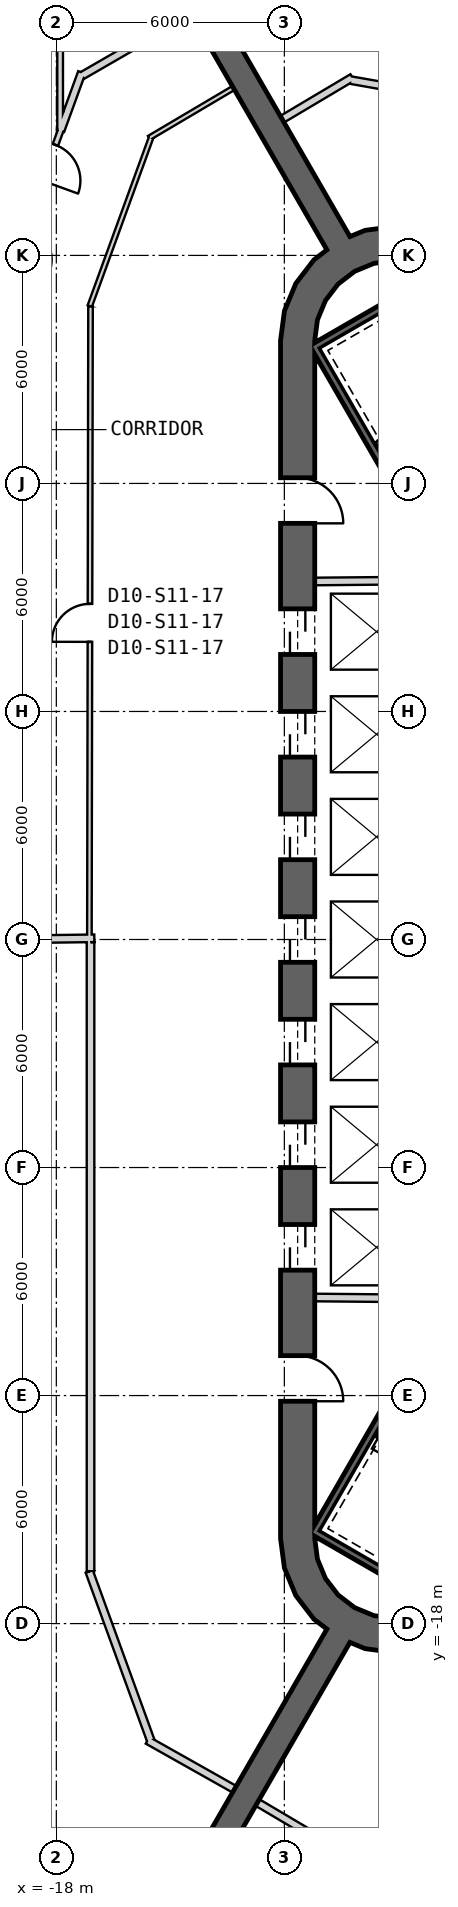
"""IFC4 building model, lengths in metres.
Left out: names, types, materials, properties, quantities, classifications, styles, units other than length and angle.
Written with IfcOpenShell. Run it as: python <this file> out.ifc"""

import sys

from ifc_helpers import new_model, si_unit, direction, frame, frame_2d, origin, place, context, subcontext, project, spatial, polyline, rectangle, outline, extrude, element, fill, save


model = new_model("IFC4")
c1 = context("Model", 3, precision=1e-05, world=origin(), true_north=direction((0.0, 1.0)))
c2 = subcontext(c1, "Body", "Model", "MODEL_VIEW")
j1 = project(units=[si_unit("LENGTHUNIT", "METRE"), si_unit("PLANEANGLEUNIT", "RADIAN")], contexts=[c1])
p1 = place(None, origin())
s1 = spatial("IfcSite", under=j1, at=p1, CompositionType="ELEMENT")
p2 = place(p1, origin())
s2 = spatial("IfcBuilding", under=s1, at=p2, CompositionType="ELEMENT")
p3 = place(p2, frame((0.0, 0.0, 193.2)))
s3 = spatial("IfcBuildingStorey", under=s2, at=p3, CompositionType="ELEMENT", Elevation=193.2)
p4 = place(p3, frame((-11.65, 15.762, 0.0), z_axis=(0.0, 0.0, 1.0), x_axis=(0.0, -1.0, 0.0)))
e1 = element("IfcWall", 1, at=p4, inside=s3, PredefinedType="SHEAR", context=c2, shape_type="SweptSolid", body=[
    extrude(rectangle(XDim=31.523, YDim=0.9, at=frame_2d((15.762, 0.0))), origin(), (0.0, 0.0, 1.0), 4.0),
])
p5 = place(p4, frame((7.062, 0.0, 0.0)))
e2 = element("IfcOpeningElement", 2, at=p5, cuts=e1, PredefinedType="OPENING", context=c2, shape_type="SweptSolid", body=[
    extrude(rectangle(XDim=1.2, YDim=2.4, at=frame_2d((0.6, 1.2))), frame((0.0, 0.46, 0.0), z_axis=(0.0, -1.0, 0.0), x_axis=(1.0, 0.0, 0.0)), (0.0, 0.0, 1.0), 0.92),
])
p6 = place(p4, frame((9.762, 0.0, 0.0)))
e3 = element("IfcOpeningElement", 3, at=p6, cuts=e1, PredefinedType="OPENING", context=c2, shape_type="SweptSolid", body=[
    extrude(rectangle(XDim=1.2, YDim=2.4, at=frame_2d((0.6, 1.2))), frame((0.0, 0.46, 0.0), z_axis=(0.0, -1.0, 0.0), x_axis=(1.0, 0.0, 0.0)), (0.0, 0.0, 1.0), 0.92),
])
p7 = place(p4, frame((12.462, 0.0, 0.0)))
e4 = element("IfcOpeningElement", 4, at=p7, cuts=e1, PredefinedType="OPENING", context=c2, shape_type="SweptSolid", body=[
    extrude(rectangle(XDim=1.2, YDim=2.4, at=frame_2d((0.6, 1.2))), frame((0.0, 0.46, 0.0), z_axis=(0.0, -1.0, 0.0), x_axis=(1.0, 0.0, 0.0)), (0.0, 0.0, 1.0), 0.92),
])
p8 = place(p4, frame((15.162, 0.0, 0.0)))
e5 = element("IfcOpeningElement", 5, at=p8, cuts=e1, PredefinedType="OPENING", context=c2, shape_type="SweptSolid", body=[
    extrude(rectangle(XDim=1.2, YDim=2.4, at=frame_2d((0.6, 1.2))), frame((0.0, 0.46, 0.0), z_axis=(0.0, -1.0, 0.0), x_axis=(1.0, 0.0, 0.0)), (0.0, 0.0, 1.0), 0.92),
])
p9 = place(p4, frame((17.862, 0.0, 0.0)))
e6 = element("IfcOpeningElement", 6, at=p9, cuts=e1, PredefinedType="OPENING", context=c2, shape_type="SweptSolid", body=[
    extrude(rectangle(XDim=1.2, YDim=2.4, at=frame_2d((0.6, 1.2))), frame((0.0, 0.46, 0.0), z_axis=(0.0, -1.0, 0.0), x_axis=(1.0, 0.0, 0.0)), (0.0, 0.0, 1.0), 0.92),
])
p10 = place(p4, frame((20.562, 0.0, 0.0)))
e7 = element("IfcOpeningElement", 7, at=p10, cuts=e1, PredefinedType="OPENING", context=c2, shape_type="SweptSolid", body=[
    extrude(rectangle(XDim=1.2, YDim=2.4, at=frame_2d((0.6, 1.2))), frame((0.0, 0.46, 0.0), z_axis=(0.0, -1.0, 0.0), x_axis=(1.0, 0.0, 0.0)), (0.0, 0.0, 1.0), 0.92),
])
p11 = place(p4, frame((23.262, 0.0, 0.0)))
e8 = element("IfcOpeningElement", 8, at=p11, cuts=e1, PredefinedType="OPENING", context=c2, shape_type="SweptSolid", body=[
    extrude(rectangle(XDim=1.2, YDim=2.4, at=frame_2d((0.6, 1.2))), frame((0.0, 0.46, 0.0), z_axis=(0.0, -1.0, 0.0), x_axis=(1.0, 0.0, 0.0)), (0.0, 0.0, 1.0), 0.92),
])
p12 = place(p4, frame((3.612, 0.0, 0.0)))
e9 = element("IfcOpeningElement", 9, at=p12, cuts=e1, PredefinedType="OPENING", context=c2, shape_type="SweptSolid", body=[
    extrude(rectangle(XDim=1.2, YDim=2.4, at=frame_2d((0.6, 1.2))), frame((0.0, 0.46, 0.0), z_axis=(0.0, -1.0, 0.0), x_axis=(1.0, 0.0, 0.0)), (0.0, 0.0, 1.0), 0.92),
])
p13 = place(p4, frame((26.712, 0.0, 0.0)))
e10 = element("IfcOpeningElement", 10, at=p13, cuts=e1, PredefinedType="OPENING", context=c2, shape_type="SweptSolid", body=[
    extrude(rectangle(XDim=1.2, YDim=2.4, at=frame_2d((0.6, 1.2))), frame((0.0, 0.46, 0.0), z_axis=(0.0, -1.0, 0.0), x_axis=(1.0, 0.0, 0.0)), (0.0, 0.0, 1.0), 0.92),
])
p14 = place(p3, origin())
e11 = element("IfcWall", 11, at=p14, inside=s3, PredefinedType="SHEAR", context=c2, shape_type="SweptSolid", body=[
    extrude(outline(polyline([(-7.6, 18.36), (-8.323, 18.659), (-9.1, 18.762), (-9.876, 18.659), (-10.6, 18.36), (-11.221, 17.883), (-11.698, 17.262), (-11.998, 16.538), (-12.1, 15.762), (-11.2, 15.762), (-11.128, 16.305), (-10.919, 16.812), (-10.585, 17.247), (-10.15, 17.58), (-9.644, 17.79), (-9.1, 17.862), (-8.556, 17.79), (-8.05, 17.58), (-7.6, 18.36)])), origin(), (0.0, 0.0, 1.0), 4.0),
])
p15 = place(p3, origin())
e12 = element("IfcWall", 12, at=p15, inside=s3, PredefinedType="SHEAR", context=c2, shape_type="SweptSolid", body=[
    extrude(outline(polyline([(-12.1, -15.762), (-11.998, -16.538), (-11.698, -17.262), (-11.221, -17.883), (-10.6, -18.36), (-9.876, -18.659), (-9.1, -18.762), (-8.323, -18.659), (-7.6, -18.36), (-8.05, -17.58), (-8.556, -17.79), (-9.1, -17.862), (-9.644, -17.79), (-10.15, -17.58), (-10.585, -17.247), (-10.919, -16.812), (-11.128, -16.305), (-11.2, -15.762), (-12.1, -15.762)])), origin(), (0.0, 0.0, 1.0), 4.0),
])
for number, where, z_axis, x_axis in (
    (13, (-10.575, 18.316, 0.0), (0.0, 0.0, 1.0), (-0.5, 0.866, 0.0)),
    (14, (-10.575, -18.316, 0.0), (0.0, 0.0, 1.0), (-0.5, -0.866, 0.0)),
):
    element("IfcWall", number, at=place(p3, frame(where, z_axis=z_axis, x_axis=x_axis)), inside=s3, PredefinedType="SHEAR", context=c2, shape_type="SweptSolid", body=[
        extrude(rectangle(XDim=12.007, YDim=0.7, at=frame_2d((6.003, 0.0))), origin(), (0.0, 0.0, 1.0), 4.0),
    ])
p16 = place(p3, frame((-11.2, 9.42, 0.0), z_axis=(0.0, 0.0, 1.0), x_axis=(0.999957167047, 0.009255488683, 0.0)))
e15 = element("IfcWall", 15, at=p16, inside=s3, PredefinedType="PLUMBINGWALL", context=c2, shape_type="SweptSolid", body=[
    extrude(rectangle(XDim=3.35, YDim=0.2, at=frame_2d((1.675, 0.0))), origin(), (0.0, 0.0, 1.0), 3.7),
])
p17 = place(p3, frame((-8.05, -9.449, 0.0), z_axis=(0.0, 0.0, 1.0), x_axis=(-0.999957467379, 0.009222983926, 0.0)))
e16 = element("IfcWall", 16, at=p17, inside=s3, PredefinedType="PLUMBINGWALL", context=c2, shape_type="SweptSolid", body=[
    extrude(rectangle(XDim=3.15, YDim=0.2, at=frame_2d((1.575, 0.0))), origin(), (0.0, 0.0, 1.0), 3.7),
])
p18 = place(p3, frame((-11.245, 15.678, -0.3), z_axis=(0.0, 0.0, 1.0), x_axis=(0.499977274689, -0.866038523851, 0.0)))
e17 = element("IfcWall", 17, at=p18, inside=s3, PredefinedType="SHEAR", context=c2, shape_type="SweptSolid", body=[
    extrude(rectangle(XDim=8.1, YDim=0.2, at=frame_2d((4.05, 0.0))), origin(), (0.0, 0.0, 1.0), 4.0),
])
for number, where, z_axis, x_axis in (
    (18, (-7.818, 17.541, -0.3), (0.0, 0.0, 1.0), (-0.866, -0.5, 0.0)),
    (19, (-11.282, -15.541, -0.3), (0.0, 0.0, 1.0), (0.866, -0.5, 0.0)),
):
    element("IfcWall", number, at=place(p3, frame(where, z_axis=z_axis, x_axis=x_axis)), inside=s3, PredefinedType="SHEAR", context=c2, shape_type="SweptSolid", body=[
        extrude(rectangle(XDim=3.8, YDim=0.2, at=frame_2d((1.9, 0.0))), origin(), (0.0, 0.0, 1.0), 4.0),
    ])
p19 = place(p3, frame((-7.196, -8.663, -0.3), z_axis=(0.0, 0.0, 1.0), x_axis=(-0.499997992926, -0.866026562566, 0.0)))
e20 = element("IfcWall", 20, at=p19, inside=s3, PredefinedType="SHEAR", context=c2, shape_type="SweptSolid", body=[
    extrude(rectangle(XDim=7.9, YDim=0.2, at=frame_2d((3.95, 0.0))), origin(), (0.0, 0.0, 1.0), 4.0),
])
p20 = place(p3, frame((-13.339, 22.405, 0.0), z_axis=(0.0, 0.0, 1.0), x_axis=(-0.86070028932, -0.509111983718, 0.0)))
e21 = element("IfcWall", 21, at=p20, inside=s3, PredefinedType="PARTITIONING", context=c2, shape_type="SweptSolid", body=[
    extrude(rectangle(XDim=2.579, YDim=0.12, at=frame_2d((1.29, 0.0))), origin(), (0.0, 0.0, 1.0), 3.7),
])
p21 = place(p3, frame((-15.506, 21.103, 0.0), z_axis=(0.0, 0.0, 1.0), x_axis=(-0.342017079535, -0.939693735909, 0.0)))
e22 = element("IfcWall", 22, at=p21, inside=s3, PredefinedType="PARTITIONING", context=c2, shape_type="SweptSolid", body=[
    extrude(rectangle(XDim=4.721, YDim=0.12, at=frame_2d((2.361, 0.0))), origin(), (0.0, 0.0, 1.0), 2.78),
])
p22 = place(p3, frame((-17.13, 0.0, 0.0), z_axis=(0.0, 0.0, 1.0), x_axis=(0.001787542932, 0.999998402344, 0.0)))
e23 = element("IfcWall", 23, at=p22, inside=s3, PredefinedType="PARTITIONING", context=c2, shape_type="SweptSolid", body=[
    extrude(rectangle(XDim=16.663, YDim=0.12, at=frame_2d((8.331, 0.0))), origin(), (0.0, 0.0, 1.0), 2.88),
])
p23 = place(p22, frame((7.831, 0.0, 0.0)))
e24 = element("IfcOpeningElement", 24, at=p23, cuts=e23, PredefinedType="OPENING", context=c2, shape_type="SweptSolid", body=[
    extrude(rectangle(XDim=1.0, YDim=2.1, at=frame_2d((0.5, 1.05))), frame((0.0, 0.07, 0.0), z_axis=(0.0, -1.0, 0.0), x_axis=(1.0, 0.0, 0.0)), (0.0, 0.0, 1.0), 0.14),
])
p24 = place(p3, frame((-19.5, -0.001, 0.0), z_axis=(0.0, 0.0, 1.0), x_axis=(0.999915662945, 0.012987185857, 0.0)))
e25 = element("IfcWall", 25, at=p24, inside=s3, PredefinedType="PARTITIONING", context=c2, shape_type="SweptSolid", body=[
    extrude(rectangle(XDim=2.5, YDim=0.2, at=frame_2d((1.25, 0.0))), origin(), (0.0, 0.0, 1.0), 3.07),
])
p25 = place(p3, frame((-17.331, 22.814, 0.0), z_axis=(0.0, 0.0, 1.0), x_axis=(-0.342055959579, -0.939679583963, 0.0)))
e26 = element("IfcWall", 26, at=p25, inside=s3, PredefinedType="PARTITIONING", context=c2, shape_type="SweptSolid", body=[
    extrude(rectangle(XDim=1.629, YDim=0.2, at=frame_2d((0.814, 0.0))), origin(), (0.0, 0.0, 1.0), 2.78),
])
p26 = place(p3, frame((-14.98, 24.083, 0.0), z_axis=(0.0, 0.0, 1.0), x_axis=(-0.866008795918, -0.500028764566, 0.0)))
e27 = element("IfcWall", 27, at=p26, inside=s3, PredefinedType="PARTITIONING", context=c2, shape_type="SweptSolid", body=[
    extrude(rectangle(XDim=2.714, YDim=0.2, at=frame_2d((1.357, 0.0))), origin(), (0.0, 0.0, 1.0), 3.7),
])
p27 = place(p3, frame((-17.888, 21.283, 0.0), z_axis=(0.0, 0.0, 1.0), x_axis=(-0.341939006975, -0.939722148036, 0.0)))
e28 = element("IfcWall", 28, at=p27, inside=s3, PredefinedType="PLUMBINGWALL", context=c2, shape_type="SweptSolid", body=[
    extrude(rectangle(XDim=1.801, YDim=0.15, at=frame_2d((0.9, 0.0))), origin(), (0.0, 0.0, 1.0), 3.7),
])
p28 = place(p27, frame((0.4, 0.0, 0.0)))
e29 = element("IfcOpeningElement", 29, at=p28, cuts=e28, PredefinedType="OPENING", context=c2, shape_type="SweptSolid", body=[
    extrude(rectangle(XDim=1.0, YDim=2.1, at=frame_2d((0.5, 1.05))), frame((0.0, 0.085, 0.0), z_axis=(0.0, -1.0, 0.0), x_axis=(1.0, 0.0, 0.0)), (0.0, 0.0, 1.0), 0.17),
])
p29 = place(p3, frame((-15.598, -21.072, 0.0), z_axis=(0.0, 0.0, 1.0), x_axis=(0.871234731294, -0.490866624438, 0.0)))
e30 = element("IfcWall", 30, at=p29, inside=s3, PredefinedType="PARTITIONING", context=c2, shape_type="SweptSolid", body=[
    extrude(rectangle(XDim=2.623, YDim=0.2, at=frame_2d((1.311, 0.0))), origin(), (0.0, 0.0, 1.0), 3.7),
])
p30 = place(p3, frame((-17.134, -16.629, 0.0), z_axis=(0.0, 0.0, 1.0), x_axis=(0.342036655594, -0.939686610647, 0.0)))
e31 = element("IfcWall", 31, at=p30, inside=s3, PredefinedType="PARTITIONING", context=c2, shape_type="SweptSolid", body=[
    extrude(rectangle(XDim=4.74, YDim=0.2, at=frame_2d((2.37, 0.0))), origin(), (0.0, 0.0, 1.0), 2.78),
])
p31 = place(p3, frame((-17.1, -0.07, 0.0), z_axis=(0.0, 0.0, 1.0), x_axis=(0.0, -1.0, 0.0)))
e32 = element("IfcWall", 32, at=p31, inside=s3, PredefinedType="PARTITIONING", context=c2, shape_type="SweptSolid", body=[
    extrude(rectangle(XDim=16.552, YDim=0.2, at=frame_2d((8.276, 0.0))), origin(), (0.0, 0.0, 1.0), 2.88),
])
p32 = place(p3, frame((-10.21, 22.681, 0.0), z_axis=(0.0, 0.0, 1.0), x_axis=(-0.859700405816, -0.510798602425, 0.0)))
e33 = element("IfcWall", 33, at=p32, inside=s3, PredefinedType="PARTITIONING", context=c2, shape_type="SweptSolid", body=[
    extrude(rectangle(XDim=2.149, YDim=0.2, at=frame_2d((1.074, 0.0))), origin(), (0.0, 0.0, 1.0), 3.7),
])
p33 = place(p3, frame((-6.285, 21.913, 0.0), z_axis=(0.0, 0.0, 1.0), x_axis=(-0.984806073034, 0.173657705026, 0.0)))
e34 = element("IfcWall", 34, at=p33, inside=s3, PredefinedType="PARTITIONING", context=c2, shape_type="SweptSolid", body=[
    extrude(rectangle(XDim=4.038, YDim=0.2, at=frame_2d((2.019, 0.0))), origin(), (0.0, 0.0, 1.0), 2.78),
])
p34 = place(p3, frame((-10.665, -24.005, 0.0), z_axis=(0.0, 0.0, 1.0), x_axis=(0.984806532296, 0.173655100553, 0.0)))
e35 = element("IfcWall", 35, at=p34, inside=s3, PredefinedType="PARTITIONING", context=c2, shape_type="SweptSolid", body=[
    extrude(rectangle(XDim=4.706, YDim=0.2, at=frame_2d((2.353, 0.0))), origin(), (0.0, 0.0, 1.0), 2.78),
])
p35 = place(p3, frame((-12.707, -22.709, 0.0), z_axis=(0.0, 0.0, 1.0), x_axis=(0.860754387085, -0.509020515415, 0.0)))
e36 = element("IfcWall", 36, at=p35, inside=s3, PredefinedType="PARTITIONING", context=c2, shape_type="SweptSolid", body=[
    extrude(rectangle(XDim=2.457, YDim=0.2, at=frame_2d((1.229, 0.0))), origin(), (0.0, 0.0, 1.0), 3.7),
])
p36 = place(p3, frame((-17.9, 21.265, 0.0), z_axis=(0.0, 0.0, 1.0), x_axis=(0.0, 1.0, 0.0)))
e37 = element("IfcWall", 37, at=p36, inside=s3, PredefinedType="PLUMBINGWALL", context=c2, shape_type="SweptSolid", body=[
    extrude(rectangle(XDim=2.3, YDim=0.15, at=frame_2d((1.15, 0.0))), origin(), (0.0, 0.0, 1.0), 2.78),
])
p37 = place(p23, origin())
e38 = element("IfcDoor", 38, at=p37, inside=s3, OperationType="SINGLE_SWING_RIGHT", PredefinedType="NOTDEFINED", context=c2, shape_type="SweptSolid", body=[
    extrude(rectangle(XDim=1.0, YDim=2.1, at=frame_2d((0.5, 1.05))), frame((0.0, 0.025, 0.0), z_axis=(0.0, -1.0, 0.0), x_axis=(1.0, 0.0, 0.0)), (0.0, 0.0, 1.0), 0.05),
])
fill(e24, e38)
p38 = place(p28, origin())
e39 = element("IfcDoor", 39, at=p38, inside=s3, OperationType="SINGLE_SWING_LEFT", PredefinedType="USERDEFINED", context=c2, shape_type="SweptSolid", body=[
    extrude(rectangle(XDim=1.0, YDim=2.1, at=frame_2d((0.5, 1.05))), frame((0.0, 0.025, 0.0), z_axis=(0.0, -1.0, 0.0), x_axis=(1.0, 0.0, 0.0)), (0.0, 0.0, 1.0), 0.05),
])
fill(e29, e39)
p39 = place(p5, origin())
e40 = element("IfcDoor", 40, at=p39, inside=s3, OperationType="SLIDING_TO_LEFT", PredefinedType="USERDEFINED", context=c2, shape_type="SweptSolid", body=[
    extrude(rectangle(XDim=1.2, YDim=2.4, at=frame_2d((0.6, 1.2))), frame((0.0, 0.025, 0.0), z_axis=(0.0, -1.0, 0.0), x_axis=(1.0, 0.0, 0.0)), (0.0, 0.0, 1.0), 0.05),
])
fill(e2, e40)
p40 = place(p6, origin())
e41 = element("IfcDoor", 41, at=p40, inside=s3, OperationType="SLIDING_TO_LEFT", PredefinedType="USERDEFINED", context=c2, shape_type="SweptSolid", body=[
    extrude(rectangle(XDim=1.2, YDim=2.4, at=frame_2d((0.6, 1.2))), frame((0.0, 0.025, 0.0), z_axis=(0.0, -1.0, 0.0), x_axis=(1.0, 0.0, 0.0)), (0.0, 0.0, 1.0), 0.05),
])
fill(e3, e41)
p41 = place(p7, origin())
e42 = element("IfcDoor", 42, at=p41, inside=s3, OperationType="SLIDING_TO_LEFT", PredefinedType="USERDEFINED", context=c2, shape_type="SweptSolid", body=[
    extrude(rectangle(XDim=1.2, YDim=2.4, at=frame_2d((0.6, 1.2))), frame((0.0, 0.025, 0.0), z_axis=(0.0, -1.0, 0.0), x_axis=(1.0, 0.0, 0.0)), (0.0, 0.0, 1.0), 0.05),
])
fill(e4, e42)
p42 = place(p8, origin())
e43 = element("IfcDoor", 43, at=p42, inside=s3, OperationType="SLIDING_TO_LEFT", PredefinedType="USERDEFINED", context=c2, shape_type="SweptSolid", body=[
    extrude(rectangle(XDim=1.2, YDim=2.4, at=frame_2d((0.6, 1.2))), frame((0.0, 0.025, 0.0), z_axis=(0.0, -1.0, 0.0), x_axis=(1.0, 0.0, 0.0)), (0.0, 0.0, 1.0), 0.05),
])
fill(e5, e43)
p43 = place(p9, origin())
e44 = element("IfcDoor", 44, at=p43, inside=s3, OperationType="SLIDING_TO_LEFT", PredefinedType="USERDEFINED", context=c2, shape_type="SweptSolid", body=[
    extrude(rectangle(XDim=1.2, YDim=2.4, at=frame_2d((0.6, 1.2))), frame((0.0, 0.025, 0.0), z_axis=(0.0, -1.0, 0.0), x_axis=(1.0, 0.0, 0.0)), (0.0, 0.0, 1.0), 0.05),
])
fill(e6, e44)
p44 = place(p10, origin())
e45 = element("IfcDoor", 45, at=p44, inside=s3, OperationType="SLIDING_TO_LEFT", PredefinedType="USERDEFINED", context=c2, shape_type="SweptSolid", body=[
    extrude(rectangle(XDim=1.2, YDim=2.4, at=frame_2d((0.6, 1.2))), frame((0.0, 0.025, 0.0), z_axis=(0.0, -1.0, 0.0), x_axis=(1.0, 0.0, 0.0)), (0.0, 0.0, 1.0), 0.05),
])
fill(e7, e45)
p45 = place(p11, origin())
e46 = element("IfcDoor", 46, at=p45, inside=s3, OperationType="SLIDING_TO_LEFT", PredefinedType="USERDEFINED", context=c2, shape_type="SweptSolid", body=[
    extrude(rectangle(XDim=1.2, YDim=2.4, at=frame_2d((0.6, 1.2))), frame((0.0, 0.025, 0.0), z_axis=(0.0, -1.0, 0.0), x_axis=(1.0, 0.0, 0.0)), (0.0, 0.0, 1.0), 0.05),
])
fill(e8, e46)
p46 = place(p12, origin())
e47 = element("IfcDoor", 47, at=p46, inside=s3, OperationType="SINGLE_SWING_RIGHT", PredefinedType="USERDEFINED", context=c2, shape_type="SweptSolid", body=[
    extrude(rectangle(XDim=1.2, YDim=2.4, at=frame_2d((0.6, 1.2))), frame((0.0, 0.025, 0.0), z_axis=(0.0, -1.0, 0.0), x_axis=(1.0, 0.0, 0.0)), (0.0, 0.0, 1.0), 0.05),
])
fill(e9, e47)
p47 = place(p13, origin())
e48 = element("IfcDoor", 48, at=p47, inside=s3, OperationType="SINGLE_SWING_RIGHT", PredefinedType="USERDEFINED", context=c2, shape_type="SweptSolid", body=[
    extrude(rectangle(XDim=1.2, YDim=2.4, at=frame_2d((0.6, 1.2))), frame((0.0, 0.025, 0.0), z_axis=(0.0, -1.0, 0.0), x_axis=(1.0, 0.0, 0.0)), (0.0, 0.0, 1.0), 0.05),
])
fill(e10, e48)
save(model, sys.argv[1])
